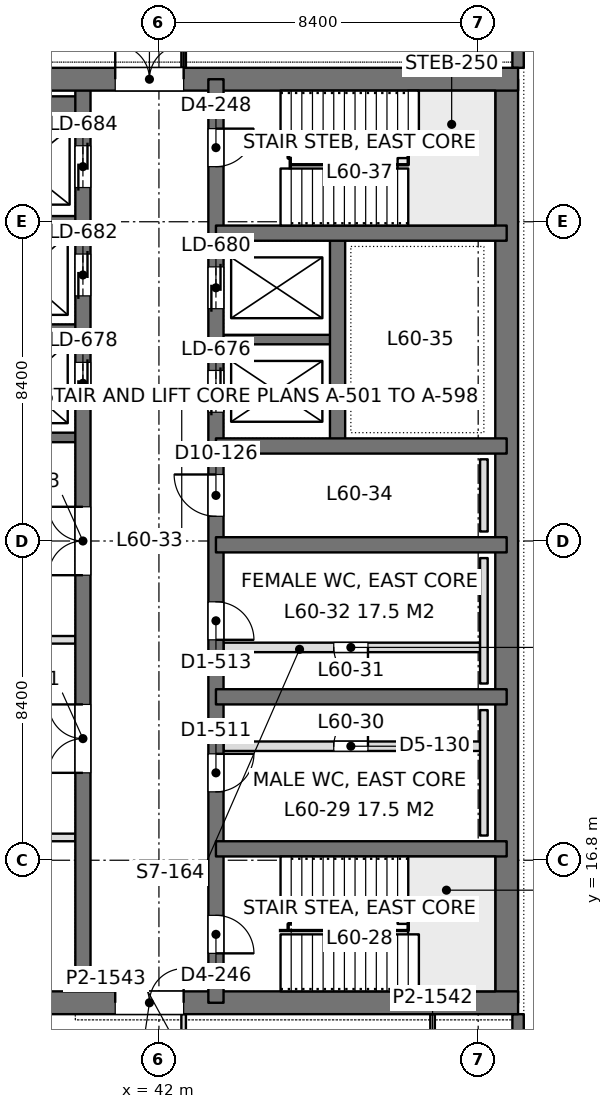
"""IFC4 building model, lengths in metres.
Left out: names, types, materials, properties, quantities, classifications, styles, units other than length and angle.
Written with IfcOpenShell. Run it as: python <this file> out.ifc"""

import sys

from ifc_helpers import new_model, si_unit, direction, frame, frame_2d, origin, place, context, subcontext, project, spatial, rectangle, extrude, element, fill, save


model = new_model("IFC4")
c1 = context("Model", 3, precision=1e-05, world=origin(), true_north=direction((0.0, 1.0)))
c2 = subcontext(c1, "Body", "Model", "MODEL_VIEW")
j1 = project(units=[si_unit("LENGTHUNIT", "METRE"), si_unit("PLANEANGLEUNIT", "RADIAN")], contexts=[c1])
p1 = place(None, origin())
s1 = spatial("IfcSite", under=j1, at=p1, CompositionType="ELEMENT")
p2 = place(p1, origin())
s2 = spatial("IfcBuilding", under=s1, at=p2, CompositionType="ELEMENT")
p3 = place(p2, frame((0.0, 0.0, 263.7)))
s3 = spatial("IfcBuildingStorey", under=s2, at=p3, CompositionType="ELEMENT", Elevation=263.7)
p4 = place(p3, frame((33.75, 13.05, 0.0), z_axis=(0.0, 0.0, 1.0), x_axis=(1.0, 0.0, 0.0)))
e1 = element("IfcWall", 1, at=p4, inside=s3, PredefinedType="SHEAR", context=c2, shape_type="SweptSolid", body=[
    extrude(rectangle(XDim=17.7, YDim=0.6, at=frame_2d((8.85, 0.0))), origin(), (0.0, 0.0, 1.0), 4.5),
])
p5 = place(p4, frame((7.1, 0.0, 0.0)))
e2 = element("IfcOpeningElement", 2, at=p5, cuts=e1, PredefinedType="OPENING", context=c2, shape_type="SweptSolid", body=[
    extrude(rectangle(XDim=1.8, YDim=2.4, at=frame_2d((0.9, 1.2))), frame((0.0, 0.31, 0.0), z_axis=(0.0, -1.0, 0.0), x_axis=(1.0, 0.0, 0.0)), (0.0, 0.0, 1.0), 0.62),
])
p6 = place(p3, frame((33.75, 37.35, 0.0), z_axis=(0.0, 0.0, 1.0), x_axis=(1.0, 0.0, 0.0)))
e3 = element("IfcWall", 3, at=p6, inside=s3, PredefinedType="SHEAR", context=c2, shape_type="SweptSolid", body=[
    extrude(rectangle(XDim=17.7, YDim=0.6, at=frame_2d((8.85, 0.0))), origin(), (0.0, 0.0, 1.0), 4.5),
])
p7 = place(p6, frame((7.1, 0.0, 0.0)))
e4 = element("IfcOpeningElement", 4, at=p7, cuts=e3, PredefinedType="OPENING", context=c2, shape_type="SweptSolid", body=[
    extrude(rectangle(XDim=1.8, YDim=2.4, at=frame_2d((0.9, 1.2))), frame((0.0, 0.31, 0.0), z_axis=(0.0, -1.0, 0.0), x_axis=(1.0, 0.0, 0.0)), (0.0, 0.0, 1.0), 0.62),
])
p8 = place(p3, frame((51.15, 13.05, 0.0), z_axis=(0.0, 0.0, 1.0), x_axis=(0.0, 1.0, 0.0)))
e5 = element("IfcWall", 5, at=p8, inside=s3, PredefinedType="SHEAR", context=c2, shape_type="SweptSolid", body=[
    extrude(rectangle(XDim=24.3, YDim=0.6, at=frame_2d((12.15, 0.0))), origin(), (0.0, 0.0, 1.0), 4.5),
])
p9 = place(p3, frame((43.5, 13.05, 0.0), z_axis=(0.0, 0.0, 1.0), x_axis=(0.0, 1.0, 0.0)))
e6 = element("IfcWall", 6, at=p9, inside=s3, PredefinedType="SHEAR", context=c2, shape_type="SweptSolid", body=[
    extrude(rectangle(XDim=24.3, YDim=0.4, at=frame_2d((12.15, 0.0))), origin(), (0.0, 0.0, 1.0), 4.5),
])
p10 = place(p9, frame((1.3, 0.0, 0.0)))
e7 = element("IfcOpeningElement", 7, at=p10, cuts=e6, PredefinedType="OPENING", context=c2, shape_type="SweptSolid", body=[
    extrude(rectangle(XDim=1.0, YDim=2.2, at=frame_2d((0.5, 1.1))), frame((0.0, 0.21, 0.0), z_axis=(0.0, -1.0, 0.0), x_axis=(1.0, 0.0, 0.0)), (0.0, 0.0, 1.0), 0.42),
])
p11 = place(p9, frame((22.0, 0.0, 0.0)))
e8 = element("IfcOpeningElement", 8, at=p11, cuts=e6, PredefinedType="OPENING", context=c2, shape_type="SweptSolid", body=[
    extrude(rectangle(XDim=1.0, YDim=2.2, at=frame_2d((0.5, 1.1))), frame((0.0, 0.21, 0.0), z_axis=(0.0, -1.0, 0.0), x_axis=(1.0, 0.0, 0.0)), (0.0, 0.0, 1.0), 0.42),
])
p12 = place(p9, frame((5.55, 0.0, 0.0)))
e9 = element("IfcOpeningElement", 9, at=p12, cuts=e6, PredefinedType="OPENING", context=c2, shape_type="SweptSolid", body=[
    extrude(rectangle(XDim=1.0, YDim=2.2, at=frame_2d((0.5, 1.1))), frame((0.0, 0.21, 0.0), z_axis=(0.0, -1.0, 0.0), x_axis=(1.0, 0.0, 0.0)), (0.0, 0.0, 1.0), 0.42),
])
p13 = place(p9, frame((9.55, 0.0, 0.0)))
e10 = element("IfcOpeningElement", 10, at=p13, cuts=e6, PredefinedType="OPENING", context=c2, shape_type="SweptSolid", body=[
    extrude(rectangle(XDim=1.0, YDim=2.2, at=frame_2d((0.5, 1.1))), frame((0.0, 0.21, 0.0), z_axis=(0.0, -1.0, 0.0), x_axis=(1.0, 0.0, 0.0)), (0.0, 0.0, 1.0), 0.42),
])
p14 = place(p9, frame((12.8, 0.0, 0.0)))
e11 = element("IfcOpeningElement", 11, at=p14, cuts=e6, PredefinedType="OPENING", context=c2, shape_type="SweptSolid", body=[
    extrude(rectangle(XDim=1.1, YDim=2.2, at=frame_2d((0.55, 1.1))), frame((0.0, 0.21, 0.0), z_axis=(0.0, -1.0, 0.0), x_axis=(1.0, 0.0, 0.0)), (0.0, 0.0, 1.0), 0.42),
])
p15 = place(p9, frame((15.538, 0.0, 0.0)))
e12 = element("IfcOpeningElement", 12, at=p15, cuts=e6, PredefinedType="OPENING", context=c2, shape_type="SweptSolid", body=[
    extrude(rectangle(XDim=1.1, YDim=2.2, at=frame_2d((0.55, 1.1))), frame((0.0, 0.21, 0.0), z_axis=(0.0, -1.0, 0.0), x_axis=(1.0, 0.0, 0.0)), (0.0, 0.0, 1.0), 0.42),
])
p16 = place(p9, frame((18.262, 0.0, 0.0)))
e13 = element("IfcOpeningElement", 13, at=p16, cuts=e6, PredefinedType="OPENING", context=c2, shape_type="SweptSolid", body=[
    extrude(rectangle(XDim=1.1, YDim=2.2, at=frame_2d((0.55, 1.1))), frame((0.0, 0.21, 0.0), z_axis=(0.0, -1.0, 0.0), x_axis=(1.0, 0.0, 0.0)), (0.0, 0.0, 1.0), 0.42),
])
p17 = place(p3, frame((40.0, 13.05, 0.0), z_axis=(0.0, 0.0, 1.0), x_axis=(0.0, 1.0, 0.0)))
e14 = element("IfcWall", 14, at=p17, inside=s3, PredefinedType="SHEAR", context=c2, shape_type="SweptSolid", body=[
    extrude(rectangle(XDim=24.3, YDim=0.4, at=frame_2d((12.15, 0.0))), origin(), (0.0, 0.0, 1.0), 4.5),
])
p18 = place(p17, frame((15.75, 0.0, 0.0)))
e15 = element("IfcOpeningElement", 15, at=p18, cuts=e14, PredefinedType="OPENING", context=c2, shape_type="SweptSolid", body=[
    extrude(rectangle(XDim=1.1, YDim=2.2, at=frame_2d((0.55, 1.1))), frame((0.0, 0.21, 0.0), z_axis=(0.0, -1.0, 0.0), x_axis=(1.0, 0.0, 0.0)), (0.0, 0.0, 1.0), 0.42),
])
p19 = place(p17, frame((18.6, 0.0, 0.0)))
e16 = element("IfcOpeningElement", 16, at=p19, cuts=e14, PredefinedType="OPENING", context=c2, shape_type="SweptSolid", body=[
    extrude(rectangle(XDim=1.1, YDim=2.2, at=frame_2d((0.55, 1.1))), frame((0.0, 0.21, 0.0), z_axis=(0.0, -1.0, 0.0), x_axis=(1.0, 0.0, 0.0)), (0.0, 0.0, 1.0), 0.42),
])
p20 = place(p17, frame((21.45, 0.0, 0.0)))
e17 = element("IfcOpeningElement", 17, at=p20, cuts=e14, PredefinedType="OPENING", context=c2, shape_type="SweptSolid", body=[
    extrude(rectangle(XDim=1.1, YDim=2.2, at=frame_2d((0.55, 1.1))), frame((0.0, 0.21, 0.0), z_axis=(0.0, -1.0, 0.0), x_axis=(1.0, 0.0, 0.0)), (0.0, 0.0, 1.0), 0.42),
])
p21 = place(p17, frame((6.05, 0.0, 0.0)))
e18 = element("IfcOpeningElement", 18, at=p21, cuts=e14, PredefinedType="OPENING", context=c2, shape_type="SweptSolid", body=[
    extrude(rectangle(XDim=1.8, YDim=2.4, at=frame_2d((0.9, 1.2))), frame((0.0, 0.21, 0.0), z_axis=(0.0, -1.0, 0.0), x_axis=(1.0, 0.0, 0.0)), (0.0, 0.0, 1.0), 0.42),
])
p22 = place(p17, frame((11.25, 0.0, 0.0)))
e19 = element("IfcOpeningElement", 19, at=p22, cuts=e14, PredefinedType="OPENING", context=c2, shape_type="SweptSolid", body=[
    extrude(rectangle(XDim=1.8, YDim=2.4, at=frame_2d((0.9, 1.2))), frame((0.0, 0.21, 0.0), z_axis=(0.0, -1.0, 0.0), x_axis=(1.0, 0.0, 0.0)), (0.0, 0.0, 1.0), 0.42),
])
for number, where, z_axis, x_axis in (
    (20, (51.15, 17.1, 0.0), (0.0, 0.0, 1.0), (-1.0, 0.0, 0.0)),
    (21, (51.15, 21.1, 0.0), (0.0, 0.0, 1.0), (-1.0, 0.0, 0.0)),
    (22, (51.15, 25.1, 0.0), (0.0, 0.0, 1.0), (-1.0, 0.0, 0.0)),
    (23, (51.15, 27.7, 0.0), (0.0, 0.0, 1.0), (-1.0, 0.0, 0.0)),
    (24, (51.15, 33.3, 0.0), (0.0, 0.0, 1.0), (-1.0, 0.0, 0.0)),
):
    element("IfcWall", number, at=place(p3, frame(where, z_axis=z_axis, x_axis=x_axis)), inside=s3, PredefinedType="SHEAR", context=c2, shape_type="SweptSolid", body=[
        extrude(rectangle(XDim=7.65, YDim=0.4, at=frame_2d((3.825, 0.0))), origin(), (0.0, 0.0, 1.0), 4.5),
    ])
p23 = place(p3, frame((46.7, 27.7, 0.0), z_axis=(0.0, 0.0, 1.0), x_axis=(0.0, 1.0, 0.0)))
e25 = element("IfcWall", 25, at=p23, inside=s3, PredefinedType="SHEAR", context=c2, shape_type="SweptSolid", body=[
    extrude(rectangle(XDim=5.6, YDim=0.4, at=frame_2d((2.8, 0.0))), origin(), (0.0, 0.0, 1.0), 4.5),
])
p24 = place(p3, frame((46.7, 30.5, 0.0), z_axis=(0.0, 0.0, 1.0), x_axis=(-1.0, 0.0, 0.0)))
e26 = element("IfcWall", 26, at=p24, inside=s3, PredefinedType="SHEAR", context=c2, shape_type="SweptSolid", body=[
    extrude(rectangle(XDim=3.2, YDim=0.25, at=frame_2d((1.6, 0.0))), origin(), (0.0, 0.0, 1.0), 4.5),
])
p25 = place(p3, frame((40.0, 27.925, 0.0), z_axis=(0.0, 0.0, 1.0), x_axis=(-1.0, 0.0, 0.0)))
e27 = element("IfcWall", 27, at=p25, inside=s3, PredefinedType="SHEAR", context=c2, shape_type="SweptSolid", body=[
    extrude(rectangle(XDim=5.95, YDim=0.25, at=frame_2d((2.975, 0.0))), origin(), (0.0, 0.0, 1.0), 4.5),
])
for number, where, z_axis, x_axis in (
    (28, (40.0, 30.775, 0.0), (0.0, 0.0, 1.0), (-1.0, 0.0, 0.0)),
    (29, (40.0, 33.625, 0.0), (0.0, 0.0, 1.0), (-1.0, 0.0, 0.0)),
):
    element("IfcWall", number, at=place(p3, frame(where, z_axis=z_axis, x_axis=x_axis)), inside=s3, PredefinedType="SHEAR", context=c2, shape_type="SweptSolid", body=[
        extrude(rectangle(XDim=3.2, YDim=0.25, at=frame_2d((1.6, 0.0))), origin(), (0.0, 0.0, 1.0), 4.5),
    ])
p26 = place(p3, frame((40.0, 36.625, 0.0), z_axis=(0.0, 0.0, 1.0), x_axis=(-1.0, 0.0, 0.0)))
e30 = element("IfcWall", 30, at=p26, inside=s3, PredefinedType="SHEAR", context=c2, shape_type="SweptSolid", body=[
    extrude(rectangle(XDim=3.2, YDim=0.55, at=frame_2d((1.6, 0.0))), origin(), (0.0, 0.0, 1.0), 4.5),
])
p27 = place(p3, frame((51.45, 42.0, 0.0), z_axis=(0.0, 0.0, 1.0), x_axis=(0.0, -1.0, 0.0)))
e31 = element("IfcWall", 31, at=p27, inside=s3, PredefinedType="SOLIDWALL", context=c2, shape_type="SweptSolid", body=[
    extrude(rectangle(XDim=4.35, YDim=0.3, at=frame_2d((2.175, 0.0))), origin(), (0.0, 0.0, 1.0), 4.35),
])
p28 = place(p27, frame((0.975, 0.0, 0.9)))
e32 = element("IfcOpeningElement", 32, at=p28, cuts=e31, PredefinedType="OPENING", context=c2, shape_type="SweptSolid", body=[
    extrude(rectangle(XDim=2.4, YDim=1.9, at=frame_2d((1.2, 0.95))), frame((0.0, 0.16, 0.0), z_axis=(0.0, -1.0, 0.0), x_axis=(1.0, 0.0, 0.0)), (0.0, 0.0, 1.0), 0.32),
])
p29 = place(p3, frame((51.45, 12.75, 0.0), z_axis=(0.0, 0.0, 1.0), x_axis=(0.0, -1.0, 0.0)))
e33 = element("IfcWall", 33, at=p29, inside=s3, PredefinedType="SOLIDWALL", context=c2, shape_type="SweptSolid", body=[
    extrude(rectangle(XDim=4.35, YDim=0.3, at=frame_2d((2.175, 0.0))), origin(), (0.0, 0.0, 1.0), 4.35),
])
p30 = place(p29, frame((0.975, 0.0, 0.9)))
e34 = element("IfcOpeningElement", 34, at=p30, cuts=e33, PredefinedType="OPENING", context=c2, shape_type="SweptSolid", body=[
    extrude(rectangle(XDim=2.4, YDim=1.9, at=frame_2d((1.2, 0.95))), frame((0.0, 0.16, 0.0), z_axis=(0.0, -1.0, 0.0), x_axis=(1.0, 0.0, 0.0)), (0.0, 0.0, 1.0), 0.32),
])
p31 = place(p3, frame((33.898, 17.4, 0.0), z_axis=(0.0, 0.0, 1.0), x_axis=(1.0, 0.0, 0.0)))
e35 = element("IfcWall", 35, at=p31, inside=s3, PredefinedType="PARTITIONING", context=c2, shape_type="SweptSolid", body=[
    extrude(rectangle(XDim=5.904, YDim=0.2, at=frame_2d((2.952, 0.0))), origin(), (0.0, 0.0, 1.0), 3.8),
])
p32 = place(p3, frame((34.749, 22.6, 0.0), z_axis=(0.0, 0.0, 1.0), x_axis=(1.0, 0.0, 0.0)))
e36 = element("IfcWall", 36, at=p32, inside=s3, PredefinedType="PARTITIONING", context=c2, shape_type="SweptSolid", body=[
    extrude(rectangle(XDim=5.053, YDim=0.2, at=frame_2d((2.526, 0.0))), origin(), (0.0, 0.0, 1.0), 4.35),
])
p33 = place(p3, frame((42.65, 10.498, 0.0), z_axis=(0.0, 0.0, 1.0), x_axis=(0.0, 1.0, 0.0)))
e37 = element("IfcWall", 37, at=p33, inside=s3, PredefinedType="PARTITIONING", context=c2, shape_type="SweptSolid", body=[
    extrude(rectangle(XDim=2.254, YDim=0.12, at=frame_2d((1.127, 0.0))), origin(), (0.0, 0.0, 1.0), 4.35),
])
p34 = place(p33, frame((0.452, 0.0, 0.0)))
e38 = element("IfcOpeningElement", 38, at=p34, cuts=e37, PredefinedType="OPENING", context=c2, shape_type="SweptSolid", body=[
    extrude(rectangle(XDim=1.1, YDim=2.4, at=frame_2d((0.55, 1.2))), frame((0.0, 0.07, 0.0), z_axis=(0.0, -1.0, 0.0), x_axis=(1.0, 0.0, 0.0)), (0.0, 0.0, 1.0), 0.14),
])
p35 = place(p3, frame((49.2, 10.4, 0.0), z_axis=(0.0, 0.0, 1.0), x_axis=(0.0, 1.0, 0.0)))
e39 = element("IfcWall", 39, at=p35, inside=s3, PredefinedType="PARTITIONING", context=c2, shape_type="SweptSolid", body=[
    extrude(rectangle(XDim=2.352, YDim=0.12, at=frame_2d((1.176, 0.0))), origin(), (0.0, 0.0, 1.0), 4.35),
])
p36 = place(p3, frame((42.65, 37.648, 0.0), z_axis=(0.0, 0.0, 1.0), x_axis=(0.0, 1.0, 0.0)))
e40 = element("IfcWall", 40, at=p36, inside=s3, PredefinedType="PARTITIONING", context=c2, shape_type="SweptSolid", body=[
    extrude(rectangle(XDim=2.254, YDim=0.12, at=frame_2d((1.127, 0.0))), origin(), (0.0, 0.0, 1.0), 4.35),
])
p37 = place(p36, frame((0.702, 0.0, 0.0)))
e41 = element("IfcOpeningElement", 41, at=p37, cuts=e40, PredefinedType="OPENING", context=c2, shape_type="SweptSolid", body=[
    extrude(rectangle(XDim=1.1, YDim=2.4, at=frame_2d((0.55, 1.2))), frame((0.0, 0.07, 0.0), z_axis=(0.0, -1.0, 0.0), x_axis=(1.0, 0.0, 0.0)), (0.0, 0.0, 1.0), 0.14),
])
p38 = place(p3, frame((49.2, 37.648, 0.0), z_axis=(0.0, 0.0, 1.0), x_axis=(0.0, 1.0, 0.0)))
e42 = element("IfcWall", 42, at=p38, inside=s3, PredefinedType="PARTITIONING", context=c2, shape_type="SweptSolid", body=[
    extrude(rectangle(XDim=2.352, YDim=0.12, at=frame_2d((1.176, 0.0))), origin(), (0.0, 0.0, 1.0), 4.35),
])
p39 = place(p3, frame((43.7, 22.4, 0.0), z_axis=(0.0, 0.0, 1.0), x_axis=(1.0, 0.0, 0.0)))
e43 = element("IfcWall", 43, at=p39, inside=s3, PredefinedType="PARTITIONING", context=c2, shape_type="SweptSolid", body=[
    extrude(rectangle(XDim=6.75, YDim=0.25, at=frame_2d((3.375, 0.0))), origin(), (0.0, 0.0, 1.0), 4.3),
])
p40 = place(p39, frame((2.9, 0.0, 0.0)))
e44 = element("IfcOpeningElement", 44, at=p40, cuts=e43, PredefinedType="OPENING", context=c2, shape_type="SweptSolid", body=[
    extrude(rectangle(XDim=0.9, YDim=2.2, at=frame_2d((0.45, 1.1))), frame((0.0, 0.135, 0.0), z_axis=(0.0, -1.0, 0.0), x_axis=(1.0, 0.0, 0.0)), (0.0, 0.0, 1.0), 0.27),
])
p41 = place(p3, frame((43.7, 19.8, 0.0), z_axis=(0.0, 0.0, 1.0), x_axis=(1.0, 0.0, 0.0)))
e45 = element("IfcWall", 45, at=p41, inside=s3, PredefinedType="PARTITIONING", context=c2, shape_type="SweptSolid", body=[
    extrude(rectangle(XDim=6.75, YDim=0.25, at=frame_2d((3.375, 0.0))), origin(), (0.0, 0.0, 1.0), 4.3),
])
p42 = place(p41, frame((2.9, 0.0, 0.0)))
e46 = element("IfcOpeningElement", 46, at=p42, cuts=e45, PredefinedType="OPENING", context=c2, shape_type="SweptSolid", body=[
    extrude(rectangle(XDim=0.9, YDim=2.2, at=frame_2d((0.45, 1.1))), frame((0.0, 0.135, 0.0), z_axis=(0.0, -1.0, 0.0), x_axis=(1.0, 0.0, 0.0)), (0.0, 0.0, 1.0), 0.27),
])
for number, where, z_axis, x_axis in (
    (47, (50.55, 17.45, 0.0), (0.0, 0.0, 1.0), (0.0, 1.0, 0.0)),
    (48, (50.55, 21.45, 0.0), (0.0, 0.0, 1.0), (0.0, 1.0, 0.0)),
):
    element("IfcWall", number, at=place(p3, frame(where, z_axis=z_axis, x_axis=x_axis)), inside=s3, PredefinedType="PLUMBINGWALL", context=c2, shape_type="SweptSolid", body=[
        extrude(rectangle(XDim=3.3, YDim=0.2, at=frame_2d((1.65, 0.0))), origin(), (0.0, 0.0, 1.0), 1.2),
    ])
p43 = place(p3, frame((50.55, 25.45, 0.0), z_axis=(0.0, 0.0, 1.0), x_axis=(0.0, 1.0, 0.0)))
e49 = element("IfcWall", 49, at=p43, inside=s3, PredefinedType="PLUMBINGWALL", context=c2, shape_type="SweptSolid", body=[
    extrude(rectangle(XDim=1.9, YDim=0.2, at=frame_2d((0.95, 0.0))), origin(), (0.0, 0.0, 1.0), 1.2),
])
p44 = place(p5, origin())
e50 = element("IfcDoor", 50, at=p44, inside=s3, OperationType="DOUBLE_DOOR_SINGLE_SWING", PredefinedType="DOOR", context=c2, shape_type="SweptSolid", body=[
    extrude(rectangle(XDim=1.8, YDim=2.4, at=frame_2d((0.9, 1.2))), frame((0.0, 0.025, 0.0), z_axis=(0.0, -1.0, 0.0), x_axis=(1.0, 0.0, 0.0)), (0.0, 0.0, 1.0), 0.05),
])
fill(e2, e50)
p45 = place(p7, origin())
e51 = element("IfcDoor", 51, at=p45, inside=s3, OperationType="DOUBLE_DOOR_SINGLE_SWING", PredefinedType="DOOR", context=c2, shape_type="SweptSolid", body=[
    extrude(rectangle(XDim=1.8, YDim=2.4, at=frame_2d((0.9, 1.2))), frame((0.0, 0.025, 0.0), z_axis=(0.0, -1.0, 0.0), x_axis=(1.0, 0.0, 0.0)), (0.0, 0.0, 1.0), 0.05),
])
fill(e4, e51)
p46 = place(p10, frame((1.0, 0.0, 0.0), z_axis=(0.0, 0.0, 1.0), x_axis=(-1.0, 0.0, 0.0)))
e52 = element("IfcDoor", 52, at=p46, inside=s3, OperationType="SINGLE_SWING_RIGHT", PredefinedType="DOOR", context=c2, shape_type="SweptSolid", body=[
    extrude(rectangle(XDim=1.0, YDim=2.2, at=frame_2d((0.5, 1.1))), frame((0.0, 0.025, 0.0), z_axis=(0.0, -1.0, 0.0), x_axis=(1.0, 0.0, 0.0)), (0.0, 0.0, 1.0), 0.05),
])
fill(e7, e52)
p47 = place(p11, frame((1.0, 0.0, 0.0), z_axis=(0.0, 0.0, 1.0), x_axis=(-1.0, 0.0, 0.0)))
e53 = element("IfcDoor", 53, at=p47, inside=s3, OperationType="SINGLE_SWING_LEFT", PredefinedType="DOOR", context=c2, shape_type="SweptSolid", body=[
    extrude(rectangle(XDim=1.0, YDim=2.2, at=frame_2d((0.5, 1.1))), frame((0.0, 0.025, 0.0), z_axis=(0.0, -1.0, 0.0), x_axis=(1.0, 0.0, 0.0)), (0.0, 0.0, 1.0), 0.05),
])
fill(e8, e53)
p48 = place(p12, frame((1.0, 0.0, 0.0), z_axis=(0.0, 0.0, 1.0), x_axis=(-1.0, 0.0, 0.0)))
e54 = element("IfcDoor", 54, at=p48, inside=s3, OperationType="SINGLE_SWING_LEFT", PredefinedType="DOOR", context=c2, shape_type="SweptSolid", body=[
    extrude(rectangle(XDim=1.0, YDim=2.2, at=frame_2d((0.5, 1.1))), frame((0.0, 0.025, 0.0), z_axis=(0.0, -1.0, 0.0), x_axis=(1.0, 0.0, 0.0)), (0.0, 0.0, 1.0), 0.05),
])
fill(e9, e54)
p49 = place(p13, frame((1.0, 0.0, 0.0), z_axis=(0.0, 0.0, 1.0), x_axis=(-1.0, 0.0, 0.0)))
e55 = element("IfcDoor", 55, at=p49, inside=s3, OperationType="SINGLE_SWING_RIGHT", PredefinedType="DOOR", context=c2, shape_type="SweptSolid", body=[
    extrude(rectangle(XDim=1.0, YDim=2.2, at=frame_2d((0.5, 1.1))), frame((0.0, 0.025, 0.0), z_axis=(0.0, -1.0, 0.0), x_axis=(1.0, 0.0, 0.0)), (0.0, 0.0, 1.0), 0.05),
])
fill(e10, e55)
p50 = place(p14, origin())
e56 = element("IfcDoor", 56, at=p50, inside=s3, OperationType="SINGLE_SWING_RIGHT", PredefinedType="DOOR", context=c2, shape_type="SweptSolid", body=[
    extrude(rectangle(XDim=1.1, YDim=2.2, at=frame_2d((0.55, 1.1))), frame((0.0, 0.025, 0.0), z_axis=(0.0, -1.0, 0.0), x_axis=(1.0, 0.0, 0.0)), (0.0, 0.0, 1.0), 0.05),
])
fill(e11, e56)
p51 = place(p18, origin())
e57 = element("IfcDoor", 57, at=p51, inside=s3, OperationType="DOUBLE_DOOR_SLIDING", PredefinedType="DOOR", context=c2, shape_type="SweptSolid", body=[
    extrude(rectangle(XDim=1.1, YDim=2.2, at=frame_2d((0.55, 1.1))), frame((0.0, 0.025, 0.0), z_axis=(0.0, -1.0, 0.0), x_axis=(1.0, 0.0, 0.0)), (0.0, 0.0, 1.0), 0.05),
])
fill(e15, e57)
p52 = place(p19, origin())
e58 = element("IfcDoor", 58, at=p52, inside=s3, OperationType="DOUBLE_DOOR_SLIDING", PredefinedType="DOOR", context=c2, shape_type="SweptSolid", body=[
    extrude(rectangle(XDim=1.1, YDim=2.2, at=frame_2d((0.55, 1.1))), frame((0.0, 0.025, 0.0), z_axis=(0.0, -1.0, 0.0), x_axis=(1.0, 0.0, 0.0)), (0.0, 0.0, 1.0), 0.05),
])
fill(e16, e58)
p53 = place(p20, origin())
e59 = element("IfcDoor", 59, at=p53, inside=s3, OperationType="DOUBLE_DOOR_SLIDING", PredefinedType="DOOR", context=c2, shape_type="SweptSolid", body=[
    extrude(rectangle(XDim=1.1, YDim=2.2, at=frame_2d((0.55, 1.1))), frame((0.0, 0.025, 0.0), z_axis=(0.0, -1.0, 0.0), x_axis=(1.0, 0.0, 0.0)), (0.0, 0.0, 1.0), 0.05),
])
fill(e17, e59)
p54 = place(p15, origin())
e60 = element("IfcDoor", 60, at=p54, inside=s3, OperationType="DOUBLE_DOOR_SLIDING", PredefinedType="DOOR", context=c2, shape_type="SweptSolid", body=[
    extrude(rectangle(XDim=1.1, YDim=2.2, at=frame_2d((0.55, 1.1))), frame((0.0, 0.025, 0.0), z_axis=(0.0, -1.0, 0.0), x_axis=(1.0, 0.0, 0.0)), (0.0, 0.0, 1.0), 0.05),
])
fill(e12, e60)
p55 = place(p16, origin())
e61 = element("IfcDoor", 61, at=p55, inside=s3, OperationType="DOUBLE_DOOR_SLIDING", PredefinedType="DOOR", context=c2, shape_type="SweptSolid", body=[
    extrude(rectangle(XDim=1.1, YDim=2.2, at=frame_2d((0.55, 1.1))), frame((0.0, 0.025, 0.0), z_axis=(0.0, -1.0, 0.0), x_axis=(1.0, 0.0, 0.0)), (0.0, 0.0, 1.0), 0.05),
])
fill(e13, e61)
p56 = place(p21, origin())
e62 = element("IfcDoor", 62, at=p56, inside=s3, OperationType="DOUBLE_DOOR_SINGLE_SWING", PredefinedType="DOOR", context=c2, shape_type="SweptSolid", body=[
    extrude(rectangle(XDim=1.8, YDim=2.4, at=frame_2d((0.9, 1.2))), frame((0.0, 0.025, 0.0), z_axis=(0.0, -1.0, 0.0), x_axis=(1.0, 0.0, 0.0)), (0.0, 0.0, 1.0), 0.05),
])
fill(e18, e62)
p57 = place(p22, origin())
e63 = element("IfcDoor", 63, at=p57, inside=s3, OperationType="DOUBLE_DOOR_SINGLE_SWING", PredefinedType="DOOR", context=c2, shape_type="SweptSolid", body=[
    extrude(rectangle(XDim=1.8, YDim=2.4, at=frame_2d((0.9, 1.2))), frame((0.0, 0.025, 0.0), z_axis=(0.0, -1.0, 0.0), x_axis=(1.0, 0.0, 0.0)), (0.0, 0.0, 1.0), 0.05),
])
fill(e19, e63)
p58 = place(p40, frame((0.9, 0.0, 0.0), z_axis=(0.0, 0.0, 1.0), x_axis=(-1.0, 0.0, 0.0)))
e64 = element("IfcDoor", 64, at=p58, inside=s3, OperationType="SINGLE_SWING_LEFT", PredefinedType="DOOR", context=c2, shape_type="SweptSolid", body=[
    extrude(rectangle(XDim=0.9, YDim=2.2, at=frame_2d((0.45, 1.1))), frame((0.0, 0.025, 0.0), z_axis=(0.0, -1.0, 0.0), x_axis=(1.0, 0.0, 0.0)), (0.0, 0.0, 1.0), 0.05),
])
fill(e44, e64)
p59 = place(p42, origin())
e65 = element("IfcDoor", 65, at=p59, inside=s3, OperationType="SINGLE_SWING_RIGHT", PredefinedType="DOOR", context=c2, shape_type="SweptSolid", body=[
    extrude(rectangle(XDim=0.9, YDim=2.2, at=frame_2d((0.45, 1.1))), frame((0.0, 0.025, 0.0), z_axis=(0.0, -1.0, 0.0), x_axis=(1.0, 0.0, 0.0)), (0.0, 0.0, 1.0), 0.05),
])
fill(e46, e65)
save(model, sys.argv[1])
